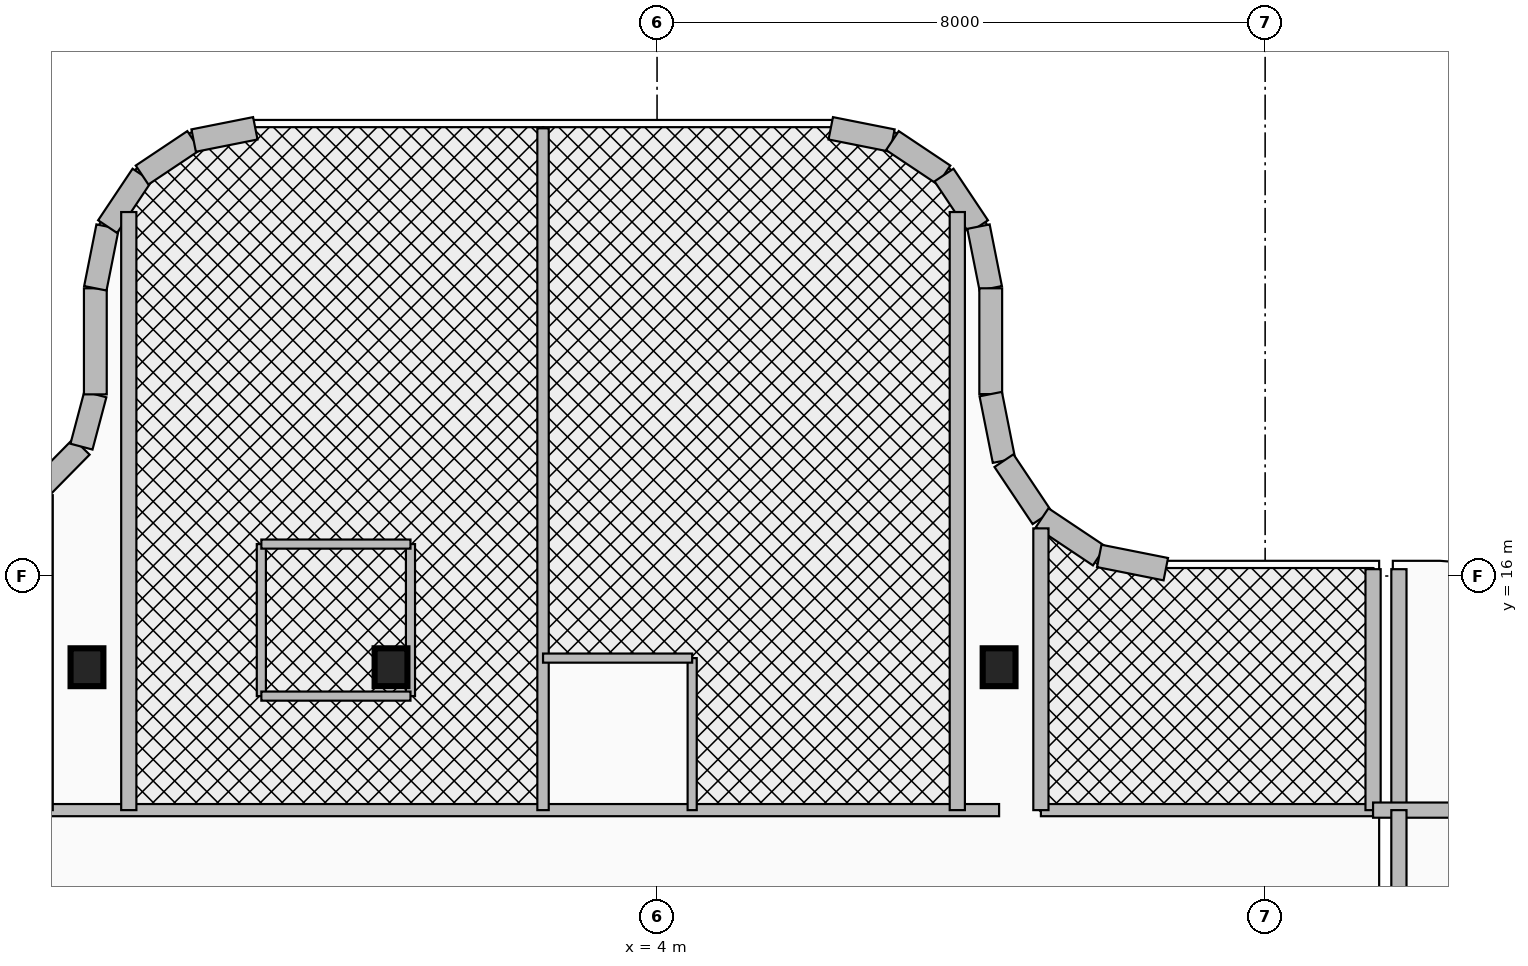
"""IFC4 building model, lengths in metres.
Left out: names, types, materials, properties, quantities, classifications, styles, units other than length and angle.
Written with IfcOpenShell. Run it as: python <this file> out.ifc"""

import sys

from ifc_helpers import new_model, si_unit, direction, frame, frame_2d, origin, origin_2d, place, context, subcontext, project, spatial, rectangle, i_section, extrude, source, transform, mapped, element, fill, save


model = new_model("IFC4")
c1 = context("Model", 3, precision=1e-05, world=origin(), true_north=direction((0.0, 1.0)))
c2 = subcontext(c1, "Body", "Model", "MODEL_VIEW")
j1 = project(units=[si_unit("LENGTHUNIT", "METRE"), si_unit("PLANEANGLEUNIT", "RADIAN")], contexts=[c1])
p1 = place(None, origin())
s1 = spatial("IfcSite", under=j1, at=p1, CompositionType="ELEMENT")
p2 = place(p1, origin())
s2 = spatial("IfcBuilding", under=s1, at=p2, CompositionType="ELEMENT")
p3 = place(p2, frame((0.0, 0.0, 172.3)))
s3 = spatial("IfcBuildingStorey", under=s2, at=p3, CompositionType="ELEMENT", Elevation=172.3)
m1 = source(origin(), c2, "Body", "SweptSolid", [
    extrude(i_section(OverallWidth=0.432, OverallDepth=0.498, WebThickness=0.056, FlangeThickness=0.089, at=origin_2d()), origin(), (0.0, 0.0, 1.0), 4.25),
])
for number, where, z_axis, x_axis in (
    (1, (-3.5, 14.8, 0.0), (0.0, 0.0, 1.0), (1.0, 0.0, 0.0)),
    (2, (8.5, 14.8, 0.0), (0.0, 0.0, 1.0), (1.0, 0.0, 0.0)),
    (3, (0.5, 14.8, 0.0), (0.0, 0.0, 1.0), (1.0, 0.0, 0.0)),
):
    element("IfcColumn", number, at=place(p3, frame(where, z_axis=z_axis, x_axis=x_axis)), inside=s3, PredefinedType="COLUMN", context=c2, shape_type="MappedRepresentation", body=[
        mapped(m1, transform((0.0, 0.0, 0.0), x_axis=(1.0, 0.0, 0.0), y_axis=(0.0, 1.0, 0.0), z_axis=(0.0, 0.0, 1.0), scale=1.0)),
    ])
p4 = place(p3, frame((-4.082, 17.184, 0.0), z_axis=(0.0, 0.0, 1.0), x_axis=(0.701538604215, 0.712631452293, 0.0)))
e4 = element("IfcWall", 4, at=p4, inside=s3, PredefinedType="SOLIDWALL", context=c2, shape_type="SweptSolid", body=[
    extrude(rectangle(XDim=0.726, YDim=0.3, at=frame_2d((0.363, 0.0))), origin(), (0.0, 0.0, 1.0), 2.915),
])
p5 = place(p3, frame((-3.573, 17.702, 0.0), z_axis=(0.0, 0.0, 1.0), x_axis=(0.256637481794, 0.966507735581, 0.0)))
e5 = element("IfcWall", 5, at=p5, inside=s3, PredefinedType="SOLIDWALL", context=c2, shape_type="SweptSolid", body=[
    extrude(rectangle(XDim=0.712, YDim=0.3, at=frame_2d((0.356, 0.0))), origin(), (0.0, 0.0, 1.0), 2.915),
])
p6 = place(p3, frame((-3.39, 18.39, 0.0), z_axis=(0.0, 0.0, 1.0), x_axis=(0.0, 1.0, 0.0)))
e6 = element("IfcWall", 6, at=p6, inside=s3, PredefinedType="SOLIDWALL", context=c2, shape_type="SweptSolid", body=[
    extrude(rectangle(XDim=1.396, YDim=0.3, at=frame_2d((0.698, 0.0))), origin(), (0.0, 0.0, 1.0), 2.915),
])
p7 = place(p3, frame((-3.39, 19.785, 0.0), z_axis=(0.0, 0.0, 1.0), x_axis=(0.195094354541, 0.980784478276, 0.0)))
e7 = element("IfcWall", 7, at=p7, inside=s3, PredefinedType="SOLIDWALL", context=c2, shape_type="SweptSolid", body=[
    extrude(rectangle(XDim=0.827, YDim=0.3, at=frame_2d((0.414, 0.0))), origin(), (0.0, 0.0, 1.0), 2.915),
])
p8 = place(p3, frame((-3.229, 20.596, 0.0), z_axis=(0.0, 0.0, 1.0), x_axis=(0.55545926088, 0.831543750805, 0.0)))
e8 = element("IfcWall", 8, at=p8, inside=s3, PredefinedType="SOLIDWALL", context=c2, shape_type="SweptSolid", body=[
    extrude(rectangle(XDim=0.816, YDim=0.3, at=frame_2d((0.408, 0.0))), origin(), (0.0, 0.0, 1.0), 2.915),
])
p9 = place(p3, frame((-2.775, 21.275, 0.0), z_axis=(0.0, 0.0, 1.0), x_axis=(0.831543750805, 0.55545926088, 0.0)))
e9 = element("IfcWall", 9, at=p9, inside=s3, PredefinedType="SOLIDWALL", context=c2, shape_type="SweptSolid", body=[
    extrude(rectangle(XDim=0.816, YDim=0.3, at=frame_2d((0.408, 0.0))), origin(), (0.0, 0.0, 1.0), 3.93),
])
for number, where, z_axis, x_axis in (
    (10, (-2.096, 21.729, 0.0), (0.0, 0.0, 1.0), (0.981, 0.195, 0.0)),
    (11, (6.285, 21.89, 0.0), (0.0, 0.0, 1.0), (0.981, -0.195, 0.0)),
):
    element("IfcWall", number, at=place(p3, frame(where, z_axis=z_axis, x_axis=x_axis)), inside=s3, PredefinedType="SOLIDWALL", context=c2, shape_type="SweptSolid", body=[
        extrude(rectangle(XDim=0.827, YDim=0.3, at=frame_2d((0.414, 0.0))), origin(), (0.0, 0.0, 1.0), 3.376),
    ])
p10 = place(p3, frame((7.096, 21.729, 0.0), z_axis=(0.0, 0.0, 1.0), x_axis=(0.831543750805, -0.55545926088, 0.0)))
e12 = element("IfcWall", 12, at=p10, inside=s3, PredefinedType="SOLIDWALL", context=c2, shape_type="SweptSolid", body=[
    extrude(rectangle(XDim=0.816, YDim=0.3, at=frame_2d((0.408, 0.0))), origin(), (0.0, 0.0, 1.0), 3.93),
])
p11 = place(p3, frame((7.775, 21.275, 0.0), z_axis=(0.0, 0.0, 1.0), x_axis=(0.55545926088, -0.831543750805, 0.0)))
e13 = element("IfcWall", 13, at=p11, inside=s3, PredefinedType="SOLIDWALL", context=c2, shape_type="SweptSolid", body=[
    extrude(rectangle(XDim=0.816, YDim=0.3, at=frame_2d((0.408, 0.0))), origin(), (0.0, 0.0, 1.0), 2.915),
])
p12 = place(p3, frame((8.229, 20.596, 0.0), z_axis=(0.0, 0.0, 1.0), x_axis=(0.195094354541, -0.980784478276, 0.0)))
e14 = element("IfcWall", 14, at=p12, inside=s3, PredefinedType="SOLIDWALL", context=c2, shape_type="SweptSolid", body=[
    extrude(rectangle(XDim=0.827, YDim=0.3, at=frame_2d((0.414, 0.0))), origin(), (0.0, 0.0, 1.0), 2.915),
])
p13 = place(p3, frame((8.39, 19.785, 0.0), z_axis=(0.0, 0.0, 1.0), x_axis=(0.0, -1.0, 0.0)))
e15 = element("IfcWall", 15, at=p13, inside=s3, PredefinedType="SOLIDWALL", context=c2, shape_type="SweptSolid", body=[
    extrude(rectangle(XDim=1.392, YDim=0.3, at=frame_2d((0.696, 0.0))), origin(), (0.0, 0.0, 1.0), 2.915),
])
p14 = place(p3, frame((8.39, 18.393, 0.0), z_axis=(0.0, 0.0, 1.0), x_axis=(0.195222179208, -0.980759043163, 0.0)))
e16 = element("IfcWall", 16, at=p14, inside=s3, PredefinedType="SOLIDWALL", context=c2, shape_type="SweptSolid", body=[
    extrude(rectangle(XDim=0.893, YDim=0.3, at=frame_2d((0.446, 0.0))), origin(), (0.0, 0.0, 1.0), 2.915),
])
for number, where, z_axis, x_axis in (
    (17, (8.564, 17.518, 0.0), (0.0, 0.0, 1.0), (0.555, -0.832, 0.0)),
    (18, (9.066, 16.766, 0.0), (0.0, 0.0, 1.0), (0.832, -0.555, 0.0)),
):
    element("IfcWall", number, at=place(p3, frame(where, z_axis=z_axis, x_axis=x_axis)), inside=s3, PredefinedType="SOLIDWALL", context=c2, shape_type="SweptSolid", body=[
        extrude(rectangle(XDim=0.904, YDim=0.3, at=frame_2d((0.452, 0.0))), origin(), (0.0, 0.0, 1.0), 2.915),
    ])
p15 = place(p3, frame((9.818, 16.264, 0.0), z_axis=(0.0, 0.0, 1.0), x_axis=(0.980800964186, -0.195011457743, 0.0)))
e19 = element("IfcWall", 19, at=p15, inside=s3, PredefinedType="SOLIDWALL", context=c2, shape_type="SweptSolid", body=[
    extrude(rectangle(XDim=0.893, YDim=0.3, at=frame_2d((0.446, 0.0))), origin(), (0.0, 0.0, 1.0), 3.93),
])
p16 = place(p3, frame((-28.25, 12.92, 0.0), z_axis=(0.0, 0.0, 1.0), x_axis=(1.0, 0.0, 0.0)))
e20 = element("IfcWall", 20, at=p16, inside=s3, PredefinedType="PARTITIONING", context=c2, shape_type="SweptSolid", body=[
    extrude(rectangle(XDim=36.75, YDim=0.16, at=frame_2d((18.375, 0.0))), origin(), (0.0, 0.0, 1.0), 2.915),
])
p17 = place(p16, frame((3.05, 0.0, 0.0)))
e21 = element("IfcOpeningElement", 21, at=p17, cuts=e20, PredefinedType="OPENING", context=c2, shape_type="SweptSolid", body=[
    extrude(rectangle(XDim=0.95, YDim=2.15, at=frame_2d((0.475, 1.075))), frame((0.0, 0.095, 0.0), z_axis=(0.0, -1.0, 0.0), x_axis=(1.0, 0.0, 0.0)), (0.0, 0.0, 1.0), 0.19),
])
p18 = place(p16, frame((10.575, 0.0, 0.0)))
e22 = element("IfcOpeningElement", 22, at=p18, cuts=e20, PredefinedType="OPENING", context=c2, shape_type="SweptSolid", body=[
    extrude(rectangle(XDim=0.95, YDim=2.15, at=frame_2d((0.475, 1.075))), frame((0.0, 0.095, 0.0), z_axis=(0.0, -1.0, 0.0), x_axis=(1.0, 0.0, 0.0)), (0.0, 0.0, 1.0), 0.19),
])
p19 = place(p16, frame((19.15, 0.0, 0.0)))
e23 = element("IfcOpeningElement", 23, at=p19, cuts=e20, PredefinedType="OPENING", context=c2, shape_type="SweptSolid", body=[
    extrude(rectangle(XDim=0.95, YDim=2.15, at=frame_2d((0.475, 1.075))), frame((0.0, 0.095, 0.0), z_axis=(0.0, -1.0, 0.0), x_axis=(1.0, 0.0, 0.0)), (0.0, 0.0, 1.0), 0.19),
])
p20 = place(p16, frame((27.55, 0.0, 0.0)))
e24 = element("IfcOpeningElement", 24, at=p20, cuts=e20, PredefinedType="OPENING", context=c2, shape_type="SweptSolid", body=[
    extrude(rectangle(XDim=0.95, YDim=2.15, at=frame_2d((0.475, 1.075))), frame((0.0, 0.095, 0.0), z_axis=(0.0, -1.0, 0.0), x_axis=(1.0, 0.0, 0.0)), (0.0, 0.0, 1.0), 0.19),
])
p21 = place(p16, frame((33.981, 0.0, 0.0)))
e25 = element("IfcOpeningElement", 25, at=p21, cuts=e20, PredefinedType="OPENING", context=c2, shape_type="SweptSolid", body=[
    extrude(rectangle(XDim=0.95, YDim=2.15, at=frame_2d((0.475, 1.075))), frame((0.0, 0.095, 0.0), z_axis=(0.0, -1.0, 0.0), x_axis=(1.0, 0.0, 0.0)), (0.0, 0.0, 1.0), 0.19),
])
p22 = place(p3, frame((-2.95, 12.92, 0.0), z_axis=(0.0, 0.0, 1.0), x_axis=(0.0, 1.0, 0.0)))
e26 = element("IfcWall", 26, at=p22, inside=s3, PredefinedType="PARTITIONING", context=c2, shape_type="SweptSolid", body=[
    extrude(rectangle(XDim=7.869, YDim=0.2, at=frame_2d((3.934, 0.0))), origin(), (0.0, 0.0, 1.0), 2.715),
])
p23 = place(p3, frame((2.5, 12.92, 0.0), z_axis=(0.0, 0.0, 1.0), x_axis=(0.0, 1.0, 0.0)))
e27 = element("IfcWall", 27, at=p23, inside=s3, PredefinedType="PARTITIONING", context=c2, shape_type="SweptSolid", body=[
    extrude(rectangle(XDim=8.97, YDim=0.15, at=frame_2d((4.485, 0.0))), origin(), (0.0, 0.0, 1.0), 2.715),
])
p24 = place(p3, frame((7.95, 12.92, 0.0), z_axis=(0.0, 0.0, 1.0), x_axis=(0.0, 1.0, 0.0)))
e28 = element("IfcWall", 28, at=p24, inside=s3, PredefinedType="PARTITIONING", context=c2, shape_type="SweptSolid", body=[
    extrude(rectangle(XDim=7.869, YDim=0.2, at=frame_2d((3.934, 0.0))), origin(), (0.0, 0.0, 1.0), 2.715),
])
for number, where, z_axis, x_axis in (
    (29, (-1.206, 14.42, 0.0), (0.0, 0.0, 1.0), (0.0, 1.0, 0.0)),
    (30, (0.756, 14.42, 0.0), (0.0, 0.0, 1.0), (0.0, 1.0, 0.0)),
):
    element("IfcWall", number, at=place(p3, frame(where, z_axis=z_axis, x_axis=x_axis)), inside=s3, PredefinedType="PARTITIONING", context=c2, shape_type="SweptSolid", body=[
        extrude(rectangle(XDim=2.0, YDim=0.12, at=frame_2d((1.0, 0.0))), origin(), (0.0, 0.0, 1.0), 2.715),
    ])
p25 = place(p3, frame((-1.206, 16.42, 0.0), z_axis=(0.0, 0.0, 1.0), x_axis=(1.0, 0.0, 0.0)))
e31 = element("IfcWall", 31, at=p25, inside=s3, PredefinedType="PARTITIONING", context=c2, shape_type="SweptSolid", body=[
    extrude(rectangle(XDim=1.962, YDim=0.12, at=frame_2d((0.981, 0.0))), origin(), (0.0, 0.0, 1.0), 3.93),
])
p26 = place(p3, frame((-1.206, 14.42, 0.0), z_axis=(0.0, 0.0, 1.0), x_axis=(1.0, 0.0, 0.0)))
e32 = element("IfcWall", 32, at=p26, inside=s3, PredefinedType="PARTITIONING", context=c2, shape_type="SweptSolid", body=[
    extrude(rectangle(XDim=1.962, YDim=0.12, at=frame_2d((0.981, 0.0))), origin(), (0.0, 0.0, 1.0), 2.715),
])
p27 = place(p26, frame((0.556, 0.0, 0.0)))
e33 = element("IfcOpeningElement", 33, at=p27, cuts=e32, PredefinedType="OPENING", context=c2, shape_type="SweptSolid", body=[
    extrude(rectangle(XDim=0.85, YDim=2.1, at=frame_2d((0.425, 1.05))), frame((0.0, 0.075, 0.0), z_axis=(0.0, -1.0, 0.0), x_axis=(1.0, 0.0, 0.0)), (0.0, 0.0, 1.0), 0.15),
])
p28 = place(p3, frame((4.462, 12.92, 0.0), z_axis=(0.0, 0.0, 1.0), x_axis=(0.0, 1.0, 0.0)))
e34 = element("IfcWall", 34, at=p28, inside=s3, PredefinedType="PARTITIONING", context=c2, shape_type="SweptSolid", body=[
    extrude(rectangle(XDim=2.0, YDim=0.12, at=frame_2d((1.0, 0.0))), origin(), (0.0, 0.0, 1.0), 2.715),
])
p29 = place(p3, frame((2.5, 14.92, 0.0), z_axis=(0.0, 0.0, 1.0), x_axis=(1.0, 0.0, 0.0)))
e35 = element("IfcWall", 35, at=p29, inside=s3, PredefinedType="PARTITIONING", context=c2, shape_type="SweptSolid", body=[
    extrude(rectangle(XDim=1.962, YDim=0.12, at=frame_2d((0.981, 0.0))), origin(), (0.0, 0.0, 1.0), 2.715),
])
p30 = place(p29, frame((0.556, 0.0, 0.0)))
e36 = element("IfcOpeningElement", 36, at=p30, cuts=e35, PredefinedType="OPENING", context=c2, shape_type="SweptSolid", body=[
    extrude(rectangle(XDim=0.85, YDim=2.1, at=frame_2d((0.425, 1.05))), frame((0.0, 0.075, 0.0), z_axis=(0.0, -1.0, 0.0), x_axis=(1.0, 0.0, 0.0)), (0.0, 0.0, 1.0), 0.15),
])
p31 = place(p3, frame((9.05, 12.92, 0.0), z_axis=(0.0, 0.0, 1.0), x_axis=(1.0, 0.0, 0.0)))
e37 = element("IfcWall", 37, at=p31, inside=s3, PredefinedType="PARTITIONING", context=c2, shape_type="SweptSolid", body=[
    extrude(rectangle(XDim=4.37, YDim=0.16, at=frame_2d((2.185, 0.0))), origin(), (0.0, 0.0, 1.0), 3.304),
])
p32 = place(p31, frame((1.4, 0.0, 0.0)))
e38 = element("IfcOpeningElement", 38, at=p32, cuts=e37, PredefinedType="OPENING", context=c2, shape_type="SweptSolid", body=[
    extrude(rectangle(XDim=0.9, YDim=2.1, at=frame_2d((0.45, 1.05))), frame((0.0, 0.095, 0.0), z_axis=(0.0, -1.0, 0.0), x_axis=(1.0, 0.0, 0.0)), (0.0, 0.0, 1.0), 0.19),
])
p33 = place(p3, frame((9.05, 12.92, 0.0), z_axis=(0.0, 0.0, 1.0), x_axis=(0.0, 1.0, 0.0)))
e39 = element("IfcWall", 39, at=p33, inside=s3, PredefinedType="PARTITIONING", context=c2, shape_type="SweptSolid", body=[
    extrude(rectangle(XDim=3.707, YDim=0.2, at=frame_2d((1.854, 0.0))), origin(), (0.0, 0.0, 1.0), 2.715),
])
for number, where, z_axis, x_axis in (
    (40, (13.42, 12.92, 0.0), (0.0, 0.0, 1.0), (0.0, 1.0, 0.0)),
    (41, (13.76, 12.92, 0.0), (0.0, 0.0, 1.0), (0.0, 1.0, 0.0)),
):
    element("IfcWall", number, at=place(p3, frame(where, z_axis=z_axis, x_axis=x_axis)), inside=s3, PredefinedType="PARTITIONING", context=c2, shape_type="SweptSolid", body=[
        extrude(rectangle(XDim=3.17, YDim=0.2, at=frame_2d((1.585, 0.0))), origin(), (0.0, 0.0, 1.0), 2.715),
    ])
p34 = place(p3, frame((13.42, 12.92, 0.0), z_axis=(0.0, 0.0, 1.0), x_axis=(1.0, 0.0, 0.0)))
e42 = element("IfcWall", 42, at=p34, inside=s3, PredefinedType="PARTITIONING", context=c2, shape_type="SweptSolid", body=[
    extrude(rectangle(XDim=1.98, YDim=0.2, at=frame_2d((0.99, 0.0))), origin(), (0.0, 0.0, 1.0), 2.715),
])
p35 = place(p3, frame((13.76, 11.42, 0.0), z_axis=(0.0, 0.0, 1.0), x_axis=(0.0, 1.0, 0.0)))
e43 = element("IfcWall", 43, at=p35, inside=s3, PredefinedType="PARTITIONING", context=c2, shape_type="SweptSolid", body=[
    extrude(rectangle(XDim=1.5, YDim=0.2, at=frame_2d((0.75, 0.0))), origin(), (0.0, 0.0, 1.0), 3.304),
])
p36 = place(p35, frame((0.225, 0.0, 0.0)))
e44 = element("IfcOpeningElement", 44, at=p36, cuts=e43, PredefinedType="OPENING", context=c2, shape_type="SweptSolid", body=[
    extrude(rectangle(XDim=1.05, YDim=2.15, at=frame_2d((0.525, 1.075))), frame((0.0, 0.115, 0.0), z_axis=(0.0, -1.0, 0.0), x_axis=(1.0, 0.0, 0.0)), (0.0, 0.0, 1.0), 0.23),
])
p37 = place(p20, origin())
e45 = element("IfcDoor", 45, at=p37, inside=s3, OperationType="SINGLE_SWING_RIGHT", PredefinedType="DOOR", context=c2, shape_type="SweptSolid", body=[
    extrude(rectangle(XDim=0.95, YDim=2.15, at=frame_2d((0.475, 1.075))), frame((0.0, 0.025, 0.0), z_axis=(0.0, -1.0, 0.0), x_axis=(1.0, 0.0, 0.0)), (0.0, 0.0, 1.0), 0.05),
])
fill(e24, e45)
p38 = place(p27, origin())
e46 = element("IfcDoor", 46, at=p38, inside=s3, OperationType="SINGLE_SWING_LEFT", PredefinedType="DOOR", context=c2, shape_type="SweptSolid", body=[
    extrude(rectangle(XDim=0.85, YDim=2.1, at=frame_2d((0.425, 1.05))), frame((0.0, 0.025, 0.0), z_axis=(0.0, -1.0, 0.0), x_axis=(1.0, 0.0, 0.0)), (0.0, 0.0, 1.0), 0.05),
])
fill(e33, e46)
p39 = place(p21, origin())
e47 = element("IfcDoor", 47, at=p39, inside=s3, OperationType="SINGLE_SWING_RIGHT", PredefinedType="DOOR", context=c2, shape_type="SweptSolid", body=[
    extrude(rectangle(XDim=0.95, YDim=2.15, at=frame_2d((0.475, 1.075))), frame((0.0, 0.025, 0.0), z_axis=(0.0, -1.0, 0.0), x_axis=(1.0, 0.0, 0.0)), (0.0, 0.0, 1.0), 0.05),
])
fill(e25, e47)
p40 = place(p30, origin())
e48 = element("IfcDoor", 48, at=p40, inside=s3, OperationType="SINGLE_SWING_LEFT", PredefinedType="DOOR", context=c2, shape_type="SweptSolid", body=[
    extrude(rectangle(XDim=0.85, YDim=2.1, at=frame_2d((0.425, 1.05))), frame((0.0, 0.025, 0.0), z_axis=(0.0, -1.0, 0.0), x_axis=(1.0, 0.0, 0.0)), (0.0, 0.0, 1.0), 0.05),
])
fill(e36, e48)
p41 = place(p32, origin())
e49 = element("IfcDoor", 49, at=p41, inside=s3, OperationType="SINGLE_SWING_RIGHT", PredefinedType="DOOR", context=c2, shape_type="SweptSolid", body=[
    extrude(rectangle(XDim=0.9, YDim=2.1, at=frame_2d((0.45, 1.05))), frame((0.0, 0.025, 0.0), z_axis=(0.0, -1.0, 0.0), x_axis=(1.0, 0.0, 0.0)), (0.0, 0.0, 1.0), 0.05),
])
fill(e38, e49)
p42 = place(p36, origin())
e50 = element("IfcDoor", 50, at=p42, inside=s3, OperationType="SINGLE_SWING_LEFT", PredefinedType="DOOR", context=c2, shape_type="SweptSolid", body=[
    extrude(rectangle(XDim=1.05, YDim=2.15, at=frame_2d((0.525, 1.075))), frame((0.0, 0.025, 0.0), z_axis=(0.0, -1.0, 0.0), x_axis=(1.0, 0.0, 0.0)), (0.0, 0.0, 1.0), 0.05),
])
fill(e44, e50)
save(model, sys.argv[1])
